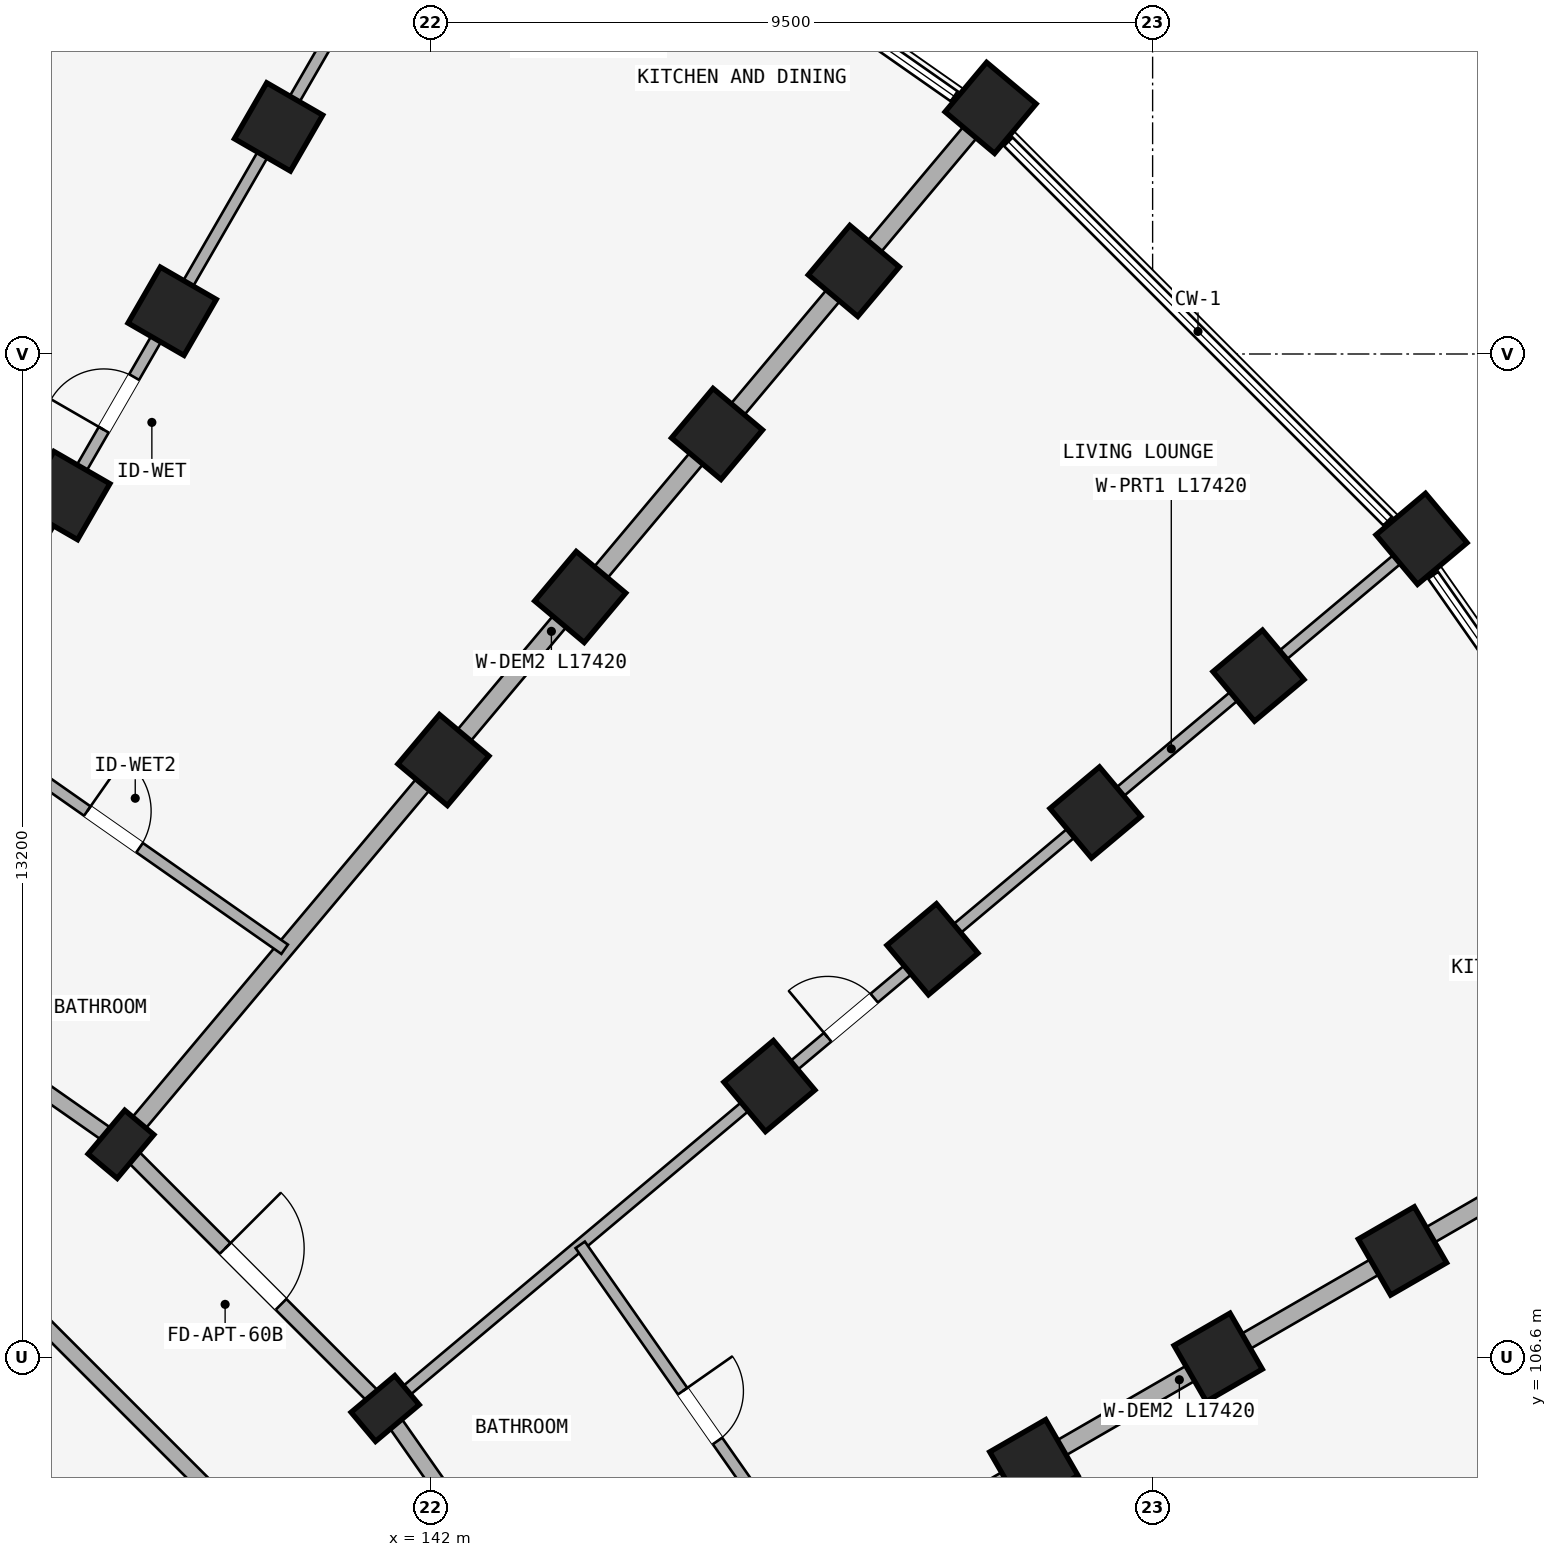
"""IFC4 building model, lengths in metres.
Left out: names, types, materials, properties, quantities, classifications, styles, units other than length and angle.
Written with IfcOpenShell. Run it as: python <this file> out.ifc"""

import sys

from ifc_helpers import new_model, si_unit, direction, frame, frame_2d, origin, origin_2d, place, context, subcontext, project, spatial, rectangle, extrude, element, fill, save


model = new_model("IFC4")
c1 = context("Model", 3, precision=1e-05, world=origin(), true_north=direction((0.0, 1.0)))
c2 = subcontext(c1, "Body", "Model", "MODEL_VIEW")
j1 = project(units=[si_unit("LENGTHUNIT", "METRE"), si_unit("PLANEANGLEUNIT", "RADIAN")], contexts=[c1])
p1 = place(None, origin())
s1 = spatial("IfcSite", under=j1, at=p1, CompositionType="ELEMENT")
p2 = place(p1, origin())
s2 = spatial("IfcBuilding", under=s1, at=p2, CompositionType="ELEMENT")
p3 = place(p2, frame((0.0, 0.0, 4.5)))
s3 = spatial("IfcBuildingStorey", under=s2, at=p3, CompositionType="ELEMENT", Elevation=4.5)
for number, where, z_axis, x_axis in (
    (1, (137.2, 117.938, 0.0), (0.0, 0.0, 1.0), (-0.866, 0.5, 0.0)),
    (2, (138.6, 120.363, 0.0), (0.0, 0.0, 1.0), (-0.866, 0.5, 0.0)),
    (3, (140.0, 122.787, 0.0), (0.0, 0.0, 1.0), (-0.866, 0.5, 0.0)),
):
    element("IfcColumn", number, at=place(p3, frame(where, z_axis=z_axis, x_axis=x_axis)), inside=s3, PredefinedType="COLUMN", context=c2, shape_type="SweptSolid", body=[
        extrude(rectangle(XDim=0.85, YDim=0.85, at=origin_2d()), origin(), (0.0, 0.0, 1.0), 3.98),
    ])
p4 = place(p3, frame((137.927, 109.402, 0.0), z_axis=(0.0, 0.0, 1.0), x_axis=(-0.766044443119, 0.642787609687, 0.0)))
e4 = element("IfcColumn", 4, at=p4, inside=s3, PredefinedType="COLUMN", context=c2, shape_type="SweptSolid", body=[
    extrude(rectangle(XDim=0.5, YDim=0.75, at=origin_2d()), origin(), (0.0, 0.0, 1.0), 3.98),
])
for number, where, z_axis, x_axis in (
    (5, (142.169, 114.458, 0.0), (0.0, 0.0, 1.0), (-0.766, 0.643, 0.0)),
    (6, (143.969, 116.603, 0.0), (0.0, 0.0, 1.0), (-0.766, 0.643, 0.0)),
    (7, (145.769, 118.748, 0.0), (0.0, 0.0, 1.0), (-0.766, 0.643, 0.0)),
    (8, (147.568, 120.893, 0.0), (0.0, 0.0, 1.0), (-0.766, 0.643, 0.0)),
    (9, (149.368, 123.038, 0.0), (0.0, 0.0, 1.0), (-0.766, 0.643, 0.0)),
):
    element("IfcColumn", number, at=place(p3, frame(where, z_axis=z_axis, x_axis=x_axis)), inside=s3, PredefinedType="COLUMN", context=c2, shape_type="SweptSolid", body=[
        extrude(rectangle(XDim=0.85, YDim=0.85, at=origin_2d()), origin(), (0.0, 0.0, 1.0), 3.98),
    ])
p5 = place(p3, frame((141.402, 105.927, 0.0), z_axis=(0.0, 0.0, 1.0), x_axis=(-0.642787609687, 0.766044443119, 0.0)))
e10 = element("IfcColumn", 10, at=p5, inside=s3, PredefinedType="COLUMN", context=c2, shape_type="SweptSolid", body=[
    extrude(rectangle(XDim=0.5, YDim=0.75, at=origin_2d()), origin(), (0.0, 0.0, 1.0), 3.98),
])
for number, where, z_axis, x_axis in (
    (11, (146.458, 110.169, 0.0), (0.0, 0.0, 1.0), (-0.643, 0.766, 0.0)),
    (12, (148.603, 111.969, 0.0), (0.0, 0.0, 1.0), (-0.643, 0.766, 0.0)),
    (13, (150.748, 113.769, 0.0), (0.0, 0.0, 1.0), (-0.643, 0.766, 0.0)),
    (14, (152.893, 115.568, 0.0), (0.0, 0.0, 1.0), (-0.643, 0.766, 0.0)),
    (15, (155.038, 117.368, 0.0), (0.0, 0.0, 1.0), (-0.643, 0.766, 0.0)),
    (16, (149.938, 105.2, 0.0), (0.0, 0.0, 1.0), (-0.5, 0.866, 0.0)),
    (17, (152.363, 106.6, 0.0), (0.0, 0.0, 1.0), (-0.5, 0.866, 0.0)),
    (18, (154.787, 108.0, 0.0), (0.0, 0.0, 1.0), (-0.5, 0.866, 0.0)),
):
    element("IfcColumn", number, at=place(p3, frame(where, z_axis=z_axis, x_axis=x_axis)), inside=s3, PredefinedType="COLUMN", context=c2, shape_type="SweptSolid", body=[
        extrude(rectangle(XDim=0.85, YDim=0.85, at=origin_2d()), origin(), (0.0, 0.0, 1.0), 3.98),
    ])
p6 = place(p3, frame((133.9, 112.222, 0.0), z_axis=(0.0, 0.0, 1.0), x_axis=(0.819140911474, -0.573592335331, 0.0)))
e19 = element("IfcWall", 19, at=p6, inside=s3, PredefinedType="STANDARD", context=c2, shape_type="SweptSolid", body=[
    extrude(rectangle(XDim=4.916, YDim=0.2, at=frame_2d((2.458, 0.0))), origin(), (0.0, 0.0, 1.0), 3.322),
])
p7 = place(p3, frame((136.384, 107.564, 0.0), z_axis=(0.0, 0.0, 1.0), x_axis=(0.707106781187, -0.707106781187, 0.0)))
e20 = element("IfcWall", 20, at=p7, inside=s3, PredefinedType="STANDARD", context=c2, shape_type="SweptSolid", body=[
    extrude(rectangle(XDim=4.497, YDim=0.2, at=frame_2d((2.249, 0.0))), origin(), (0.0, 0.0, 1.0), 3.322),
])
p8 = place(p3, frame((137.927, 109.402, 0.0), z_axis=(0.0, 0.0, 1.0), x_axis=(0.707106781187, -0.707106781187, 0.0)))
e21 = element("IfcWall", 21, at=p8, inside=s3, PredefinedType="STANDARD", context=c2, shape_type="SweptSolid", body=[
    extrude(rectangle(XDim=4.916, YDim=0.2, at=frame_2d((2.458, 0.0))), origin(), (0.0, 0.0, 1.0), 3.322),
])
p9 = place(p8, frame((1.938, 0.0, 0.0)))
e22 = element("IfcOpeningElement", 22, at=p9, cuts=e21, PredefinedType="OPENING", context=c2, shape_type="SweptSolid", body=[
    extrude(rectangle(XDim=1.04, YDim=2.15, at=frame_2d((0.52, 1.075))), frame((0.0, 0.11, 0.0), z_axis=(0.0, -1.0, 0.0), x_axis=(1.0, 0.0, 0.0)), (0.0, 0.0, 1.0), 0.22),
])
p10 = place(p3, frame((141.402, 105.927, 0.0), z_axis=(0.0, 0.0, 1.0), x_axis=(0.573592335331, -0.819140911474, 0.0)))
e23 = element("IfcWall", 23, at=p10, inside=s3, PredefinedType="STANDARD", context=c2, shape_type="SweptSolid", body=[
    extrude(rectangle(XDim=4.916, YDim=0.2, at=frame_2d((2.458, 0.0))), origin(), (0.0, 0.0, 1.0), 3.322),
])
p11 = place(p3, frame((133.95, 112.309, 0.0), z_axis=(0.0, 0.0, 1.0), x_axis=(0.499997843263, 0.866026648973, 0.0)))
e24 = element("IfcWall", 24, at=p11, inside=s3, PredefinedType="PARTITIONING", context=c2, shape_type="SweptSolid", body=[
    extrude(rectangle(XDim=17.42, YDim=0.15, at=frame_2d((8.71, 0.0))), origin(), (0.0, 0.0, 1.0), 3.322),
])
p12 = place(p11, frame((7.5, 0.0, 0.0)))
e25 = element("IfcOpeningElement", 25, at=p12, cuts=e24, PredefinedType="OPENING", context=c2, shape_type="SweptSolid", body=[
    extrude(rectangle(XDim=0.8, YDim=2.1, at=frame_2d((0.4, 1.05))), frame((0.0, 0.085, 0.0), z_axis=(0.0, -1.0, 0.0), x_axis=(1.0, 0.0, 0.0)), (0.0, 0.0, 1.0), 0.17),
])
p13 = place(p3, frame((137.991, 109.479, 0.0), z_axis=(0.0, 0.0, 1.0), x_axis=(0.642784757967, 0.766046835987, 0.0)))
e26 = element("IfcWall", 26, at=p13, inside=s3, PredefinedType="STANDARD", context=c2, shape_type="SweptSolid", body=[
    extrude(rectangle(XDim=17.42, YDim=0.23, at=frame_2d((8.71, 0.0))), origin(), (0.0, 0.0, 1.0), 3.322),
])
p14 = place(p3, frame((141.479, 105.991, 0.0), z_axis=(0.0, 0.0, 1.0), x_axis=(0.766046835987, 0.642784757967, 0.0)))
e27 = element("IfcWall", 27, at=p14, inside=s3, PredefinedType="PARTITIONING", context=c2, shape_type="SweptSolid", body=[
    extrude(rectangle(XDim=17.42, YDim=0.15, at=frame_2d((8.71, 0.0))), origin(), (0.0, 0.0, 1.0), 3.322),
])
p15 = place(p14, frame((7.5, 0.0, 0.0)))
e28 = element("IfcOpeningElement", 28, at=p15, cuts=e27, PredefinedType="OPENING", context=c2, shape_type="SweptSolid", body=[
    extrude(rectangle(XDim=0.8, YDim=2.1, at=frame_2d((0.4, 1.05))), frame((0.0, 0.085, 0.0), z_axis=(0.0, -1.0, 0.0), x_axis=(1.0, 0.0, 0.0)), (0.0, 0.0, 1.0), 0.17),
])
p16 = place(p3, frame((144.309, 101.95, 0.0), z_axis=(0.0, 0.0, 1.0), x_axis=(0.866026648973, 0.499997843263, 0.0)))
e29 = element("IfcWall", 29, at=p16, inside=s3, PredefinedType="STANDARD", context=c2, shape_type="SweptSolid", body=[
    extrude(rectangle(XDim=17.42, YDim=0.23, at=frame_2d((8.71, 0.0))), origin(), (0.0, 0.0, 1.0), 3.322),
])
p17 = place(p3, frame((135.575, 115.123, 0.0), z_axis=(0.0, 0.0, 1.0), x_axis=(0.819156831143, -0.573569599955, 0.0)))
e30 = element("IfcWall", 30, at=p17, inside=s3, PredefinedType="PLUMBINGWALL", context=c2, shape_type="SweptSolid", body=[
    extrude(rectangle(XDim=5.5, YDim=0.15, at=frame_2d((2.75, 0.0))), origin(), (0.0, 0.0, 1.0), 3.322),
])
p18 = place(p17, frame((2.33, 0.0, 0.0)))
e31 = element("IfcOpeningElement", 31, at=p18, cuts=e30, PredefinedType="OPENING", context=c2, shape_type="SweptSolid", body=[
    extrude(rectangle(XDim=0.84, YDim=2.1, at=frame_2d((0.42, 1.05))), frame((0.0, 0.085, 0.0), z_axis=(0.0, -1.0, 0.0), x_axis=(1.0, 0.0, 0.0)), (0.0, 0.0, 1.0), 0.17),
])
p19 = place(p3, frame((143.969, 108.08, 0.0), z_axis=(0.0, 0.0, 1.0), x_axis=(0.573569599955, -0.819156831143, 0.0)))
e32 = element("IfcWall", 32, at=p19, inside=s3, PredefinedType="PLUMBINGWALL", context=c2, shape_type="SweptSolid", body=[
    extrude(rectangle(XDim=5.5, YDim=0.15, at=frame_2d((2.75, 0.0))), origin(), (0.0, 0.0, 1.0), 3.322),
])
p20 = place(p19, frame((2.35, 0.0, 0.0)))
e33 = element("IfcOpeningElement", 33, at=p20, cuts=e32, PredefinedType="OPENING", context=c2, shape_type="SweptSolid", body=[
    extrude(rectangle(XDim=0.8, YDim=2.1, at=frame_2d((0.4, 1.05))), frame((0.0, 0.085, 0.0), z_axis=(0.0, -1.0, 0.0), x_axis=(1.0, 0.0, 0.0)), (0.0, 0.0, 1.0), 0.17),
])
p21 = place(p12, origin())
e34 = element("IfcDoor", 34, at=p21, inside=s3, OperationType="SINGLE_SWING_LEFT", PredefinedType="DOOR", context=c2, shape_type="SweptSolid", body=[
    extrude(rectangle(XDim=0.8, YDim=2.1, at=frame_2d((0.4, 1.05))), frame((0.0, 0.025, 0.0), z_axis=(0.0, -1.0, 0.0), x_axis=(1.0, 0.0, 0.0)), (0.0, 0.0, 1.0), 0.05),
])
fill(e25, e34)
p22 = place(p15, origin())
e35 = element("IfcDoor", 35, at=p22, inside=s3, OperationType="SINGLE_SWING_LEFT", PredefinedType="DOOR", context=c2, shape_type="SweptSolid", body=[
    extrude(rectangle(XDim=0.8, YDim=2.1, at=frame_2d((0.4, 1.05))), frame((0.0, 0.025, 0.0), z_axis=(0.0, -1.0, 0.0), x_axis=(1.0, 0.0, 0.0)), (0.0, 0.0, 1.0), 0.05),
])
fill(e28, e35)
p23 = place(p18, frame((0.84, 0.0, 0.0), z_axis=(0.0, 0.0, 1.0), x_axis=(-1.0, 0.0, 0.0)))
e36 = element("IfcDoor", 36, at=p23, inside=s3, OperationType="SINGLE_SWING_RIGHT", PredefinedType="DOOR", context=c2, shape_type="SweptSolid", body=[
    extrude(rectangle(XDim=0.84, YDim=2.1, at=frame_2d((0.42, 1.05))), frame((0.0, 0.025, 0.0), z_axis=(0.0, -1.0, 0.0), x_axis=(1.0, 0.0, 0.0)), (0.0, 0.0, 1.0), 0.05),
])
fill(e31, e36)
p24 = place(p9, origin())
e37 = element("IfcDoor", 37, at=p24, inside=s3, OperationType="SINGLE_SWING_LEFT", PredefinedType="DOOR", context=c2, shape_type="SweptSolid", body=[
    extrude(rectangle(XDim=1.04, YDim=2.15, at=frame_2d((0.52, 1.075))), frame((0.0, 0.025, 0.0), z_axis=(0.0, -1.0, 0.0), x_axis=(1.0, 0.0, 0.0)), (0.0, 0.0, 1.0), 0.05),
])
fill(e22, e37)
p25 = place(p20, frame((0.8, 0.0, 0.0), z_axis=(0.0, 0.0, 1.0), x_axis=(-1.0, 0.0, 0.0)))
e38 = element("IfcDoor", 38, at=p25, inside=s3, OperationType="SINGLE_SWING_RIGHT", PredefinedType="DOOR", context=c2, shape_type="SweptSolid", body=[
    extrude(rectangle(XDim=0.8, YDim=2.1, at=frame_2d((0.4, 1.05))), frame((0.0, 0.025, 0.0), z_axis=(0.0, -1.0, 0.0), x_axis=(1.0, 0.0, 0.0)), (0.0, 0.0, 1.0), 0.05),
])
fill(e33, e38)
save(model, sys.argv[1])
